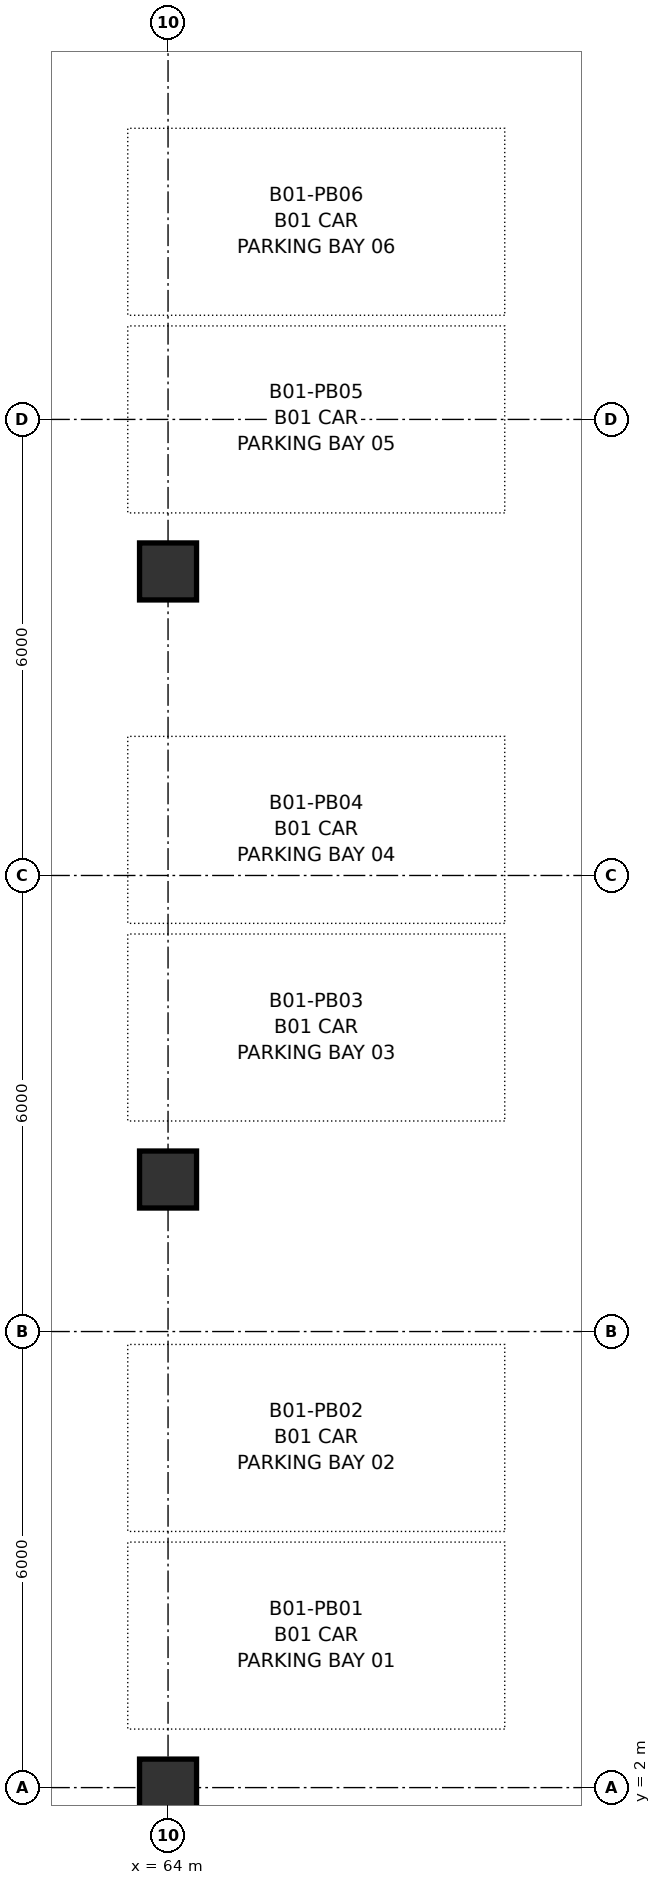
"""IFC4 building model, lengths in metres.
Left out: names, types, materials, properties, quantities, classifications, styles, units other than length and angle.
Written with IfcOpenShell. Run it as: python <this file> out.ifc"""

import sys

from ifc_helpers import new_model, si_unit, direction, frame, origin, origin_2d, place, context, subcontext, project, spatial, rectangle, extrude, source, transform, mapped, element, save


model = new_model("IFC4")
c1 = context("Model", 3, precision=1e-05, world=origin(), true_north=direction((0.0, 1.0)))
c2 = subcontext(c1, "Body", "Model", "MODEL_VIEW")
j1 = project(units=[si_unit("LENGTHUNIT", "METRE"), si_unit("PLANEANGLEUNIT", "RADIAN")], contexts=[c1])
p1 = place(None, origin())
s1 = spatial("IfcSite", under=j1, at=p1, CompositionType="ELEMENT")
p2 = place(p1, origin())
s2 = spatial("IfcBuilding", under=s1, at=p2, CompositionType="ELEMENT")
p3 = place(p2, frame((0.0, 0.0, -4.2)))
s3 = spatial("IfcBuildingStorey", under=s2, at=p3, CompositionType="ELEMENT", Elevation=-4.2)
m1 = source(origin(), c2, "Body", "SweptSolid", [
    extrude(rectangle(XDim=0.75, YDim=0.75, at=origin_2d()), origin(), (0.0, 0.0, 1.0), 3.985),
])
for number, where, z_axis, x_axis in (
    (1, (64.0, 2.0, 0.0), (0.0, 0.0, 1.0), (1.0, 0.0, 0.0)),
    (2, (64.0, 10.0, 0.0), (0.0, 0.0, 1.0), (1.0, 0.0, 0.0)),
    (3, (64.0, 18.0, 0.0), (0.0, 0.0, 1.0), (1.0, 0.0, 0.0)),
):
    element("IfcColumn", number, at=place(p3, frame(where, z_axis=z_axis, x_axis=x_axis)), inside=s3, PredefinedType="COLUMN", context=c2, shape_type="MappedRepresentation", body=[
        mapped(m1, transform((0.0, 0.0, 0.0), x_axis=(1.0, 0.0, 0.0), y_axis=(0.0, 1.0, 0.0), z_axis=(0.0, 0.0, 1.0), scale=1.0)),
    ])
save(model, sys.argv[1])
